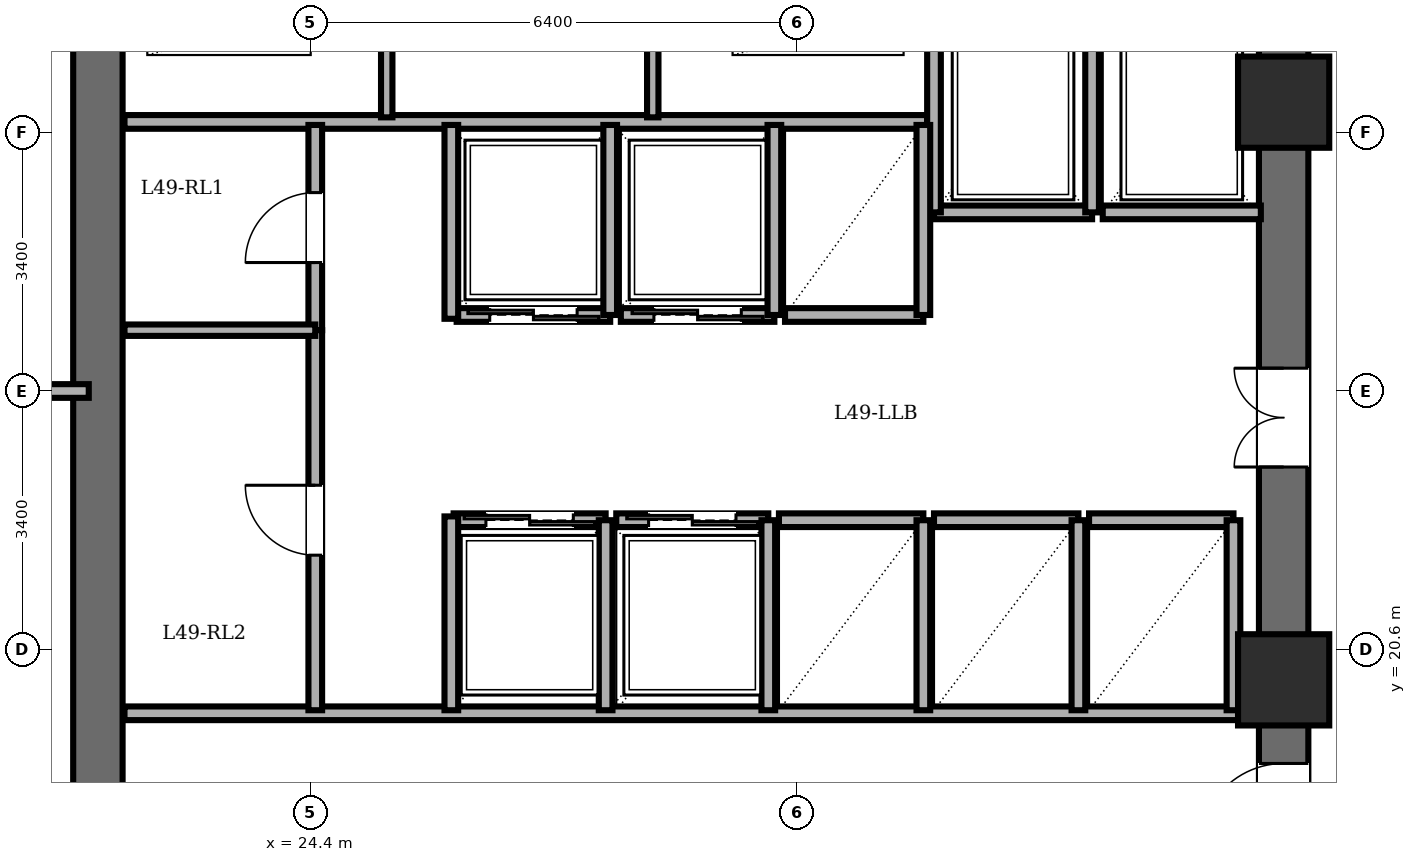
"""IFC4 building model, lengths in metres.
Left out: names, types, materials, properties, quantities, classifications, styles, units other than length and angle.
Written with IfcOpenShell. Run it as: python <this file> out.ifc"""

import sys

from ifc_helpers import new_model, si_unit, direction, frame, frame_2d, origin, origin_2d, place, context, subcontext, project, spatial, rectangle, extrude, element, fill, save


model = new_model("IFC4")
c1 = context("Model", 3, precision=1e-05, world=origin(), true_north=direction((0.0, 1.0)))
c2 = subcontext(c1, "Body", "Model", "MODEL_VIEW")
j1 = project(units=[si_unit("LENGTHUNIT", "METRE"), si_unit("PLANEANGLEUNIT", "RADIAN")], contexts=[c1])
p1 = place(None, origin())
s1 = spatial("IfcSite", under=j1, at=p1, CompositionType="ELEMENT")
p2 = place(p1, origin())
s2 = spatial("IfcBuilding", under=s1, at=p2, CompositionType="ELEMENT")
p3 = place(p2, frame((0.0, 0.0, 187.0)))
s3 = spatial("IfcBuildingStorey", under=s2, at=p3, CompositionType="ELEMENT", Elevation=187.0)
for number, where, z_axis, x_axis in (
    (1, (37.2, 20.2, 0.0), (0.0, 0.0, 1.0), (1.0, 0.0, 0.0)),
    (2, (37.2, 27.8, 0.0), (0.0, 0.0, 1.0), (1.0, 0.0, 0.0)),
):
    element("IfcColumn", number, at=place(p3, frame(where, z_axis=z_axis, x_axis=x_axis)), inside=s3, PredefinedType="COLUMN", context=c2, shape_type="SweptSolid", body=[
        extrude(rectangle(XDim=1.2, YDim=1.2, at=origin_2d()), origin(), (0.0, 0.0, 1.0), 3.6),
    ])
p4 = place(p3, frame((21.6, 14.4, 0.0), z_axis=(0.0, 0.0, 1.0), x_axis=(0.0, 1.0, 0.0)))
e3 = element("IfcWall", 3, at=p4, inside=s3, PredefinedType="SHEAR", context=c2, shape_type="SweptSolid", body=[
    extrude(rectangle(XDim=19.2, YDim=0.65, at=frame_2d((9.6, 0.0))), origin(), (0.0, 0.0, 1.0), 3.36),
])
p5 = place(p3, frame((37.2, 14.4, 0.0), z_axis=(0.0, 0.0, 1.0), x_axis=(0.0, 1.0, 0.0)))
e4 = element("IfcWall", 4, at=p5, inside=s3, PredefinedType="SHEAR", context=c2, shape_type="SweptSolid", body=[
    extrude(rectangle(XDim=19.2, YDim=0.65, at=frame_2d((9.6, 0.0))), origin(), (0.0, 0.0, 1.0), 3.36),
])
p6 = place(p5, frame((15.8, 0.0, 0.0)))
e5 = element("IfcOpeningElement", 5, at=p6, cuts=e4, PredefinedType="OPENING", context=c2, shape_type="SweptSolid", body=[
    extrude(rectangle(XDim=1.15, YDim=2.15, at=frame_2d((0.575, 1.075))), frame((0.0, 0.335, 0.0), z_axis=(0.0, -1.0, 0.0), x_axis=(1.0, 0.0, 0.0)), (0.0, 0.0, 1.0), 0.67),
])
p7 = place(p5, frame((3.6, 0.0, 0.0)))
e6 = element("IfcOpeningElement", 6, at=p7, cuts=e4, PredefinedType="OPENING", context=c2, shape_type="SweptSolid", body=[
    extrude(rectangle(XDim=1.1, YDim=2.15, at=frame_2d((0.55, 1.075))), frame((0.0, 0.335, 0.0), z_axis=(0.0, -1.0, 0.0), x_axis=(1.0, 0.0, 0.0)), (0.0, 0.0, 1.0), 0.67),
])
p8 = place(p5, frame((8.6, 0.0, 0.0)))
e7 = element("IfcOpeningElement", 7, at=p8, cuts=e4, PredefinedType="OPENING", context=c2, shape_type="SweptSolid", body=[
    extrude(rectangle(XDim=1.3, YDim=2.2, at=frame_2d((0.65, 1.1))), frame((0.0, 0.335, 0.0), z_axis=(0.0, -1.0, 0.0), x_axis=(1.0, 0.0, 0.0)), (0.0, 0.0, 1.0), 0.67),
])
p9 = place(p3, frame((21.95, 27.54, 0.0), z_axis=(0.0, 0.0, 1.0), x_axis=(1.0, 0.0, 0.0)))
e8 = element("IfcWall", 8, at=p9, inside=s3, PredefinedType="PARTITIONING", context=c2, shape_type="SweptSolid", body=[
    extrude(rectangle(XDim=10.56, YDim=0.18, at=frame_2d((5.28, 0.0))), origin(), (0.0, 0.0, 1.0), 3.36),
])
for number, where, z_axis, x_axis in (
    (9, (25.4, 27.6, 0.0), (0.0, 0.0, 1.0), (0.0, 1.0, 0.0)),
    (10, (28.9, 27.6, 0.0), (0.0, 0.0, 1.0), (0.0, 1.0, 0.0)),
):
    element("IfcWall", number, at=place(p3, frame(where, z_axis=z_axis, x_axis=x_axis)), inside=s3, PredefinedType="PARTITIONING", context=c2, shape_type="SweptSolid", body=[
        extrude(rectangle(XDim=1.52, YDim=0.15, at=frame_2d((0.76, 0.0))), origin(), (0.0, 0.0, 1.0), 3.36),
    ])
p10 = place(p3, frame((21.95, 19.76, 0.0), z_axis=(0.0, 0.0, 1.0), x_axis=(1.0, 0.0, 0.0)))
e11 = element("IfcWall", 11, at=p10, inside=s3, PredefinedType="PARTITIONING", context=c2, shape_type="SweptSolid", body=[
    extrude(rectangle(XDim=14.87, YDim=0.18, at=frame_2d((7.435, 0.0))), origin(), (0.0, 0.0, 1.0), 3.36),
])
p11 = place(p3, frame((34.68, 26.35, 0.0), z_axis=(0.0, 0.0, 1.0), x_axis=(-1.0, 0.0, 0.0)))
e12 = element("IfcWall", 12, at=p11, inside=s3, PredefinedType="PARTITIONING", context=c2, shape_type="SweptSolid", body=[
    extrude(rectangle(XDim=2.08, YDim=0.18, at=frame_2d((1.04, 0.0))), origin(), (0.0, 0.0, 1.0), 3.36),
])
for number, where, z_axis, x_axis in (
    (13, (34.68, 26.35, 0.0), (0.0, 0.0, 1.0), (0.0, 1.0, 0.0)),
    (14, (32.6, 29.08, 0.0), (0.0, 0.0, 1.0), (0.0, -1.0, 0.0)),
):
    element("IfcWall", number, at=place(p3, frame(where, z_axis=z_axis, x_axis=x_axis)), inside=s3, PredefinedType="PARTITIONING", context=c2, shape_type="SweptSolid", body=[
        extrude(rectangle(XDim=2.73, YDim=0.18, at=frame_2d((1.365, 0.0))), origin(), (0.0, 0.0, 1.0), 3.36),
    ])
p12 = place(p3, frame((36.9, 26.35, 0.0), z_axis=(0.0, 0.0, 1.0), x_axis=(-1.0, 0.0, 0.0)))
e15 = element("IfcWall", 15, at=p12, inside=s3, PredefinedType="PARTITIONING", context=c2, shape_type="SweptSolid", body=[
    extrude(rectangle(XDim=2.08, YDim=0.18, at=frame_2d((1.04, 0.0))), origin(), (0.0, 0.0, 1.0), 3.36),
])
p13 = place(p3, frame((28.34, 25.0, 0.0), z_axis=(0.0, 0.0, 1.0), x_axis=(-1.0, 0.0, 0.0)))
e16 = element("IfcWall", 16, at=p13, inside=s3, PredefinedType="PARTITIONING", context=c2, shape_type="SweptSolid", body=[
    extrude(rectangle(XDim=2.02, YDim=0.18, at=frame_2d((1.01, 0.0))), origin(), (0.0, 0.0, 1.0), 3.36),
])
p14 = place(p13, frame((0.435, 0.0, 0.0)))
e17 = element("IfcOpeningElement", 17, at=p14, cuts=e16, PredefinedType="OPENING", context=c2, shape_type="SweptSolid", body=[
    extrude(rectangle(XDim=1.15, YDim=2.2, at=frame_2d((0.575, 1.1))), frame((0.0, 0.1, 0.0), z_axis=(0.0, -1.0, 0.0), x_axis=(1.0, 0.0, 0.0)), (0.0, 0.0, 1.0), 0.2),
])
p15 = place(p3, frame((28.34, 25.0, 0.0), z_axis=(0.0, 0.0, 1.0), x_axis=(0.0, 1.0, 0.0)))
e18 = element("IfcWall", 18, at=p15, inside=s3, PredefinedType="PARTITIONING", context=c2, shape_type="SweptSolid", body=[
    extrude(rectangle(XDim=2.5, YDim=0.18, at=frame_2d((1.25, 0.0))), origin(), (0.0, 0.0, 1.0), 3.36),
])
p16 = place(p3, frame((30.5, 25.0, 0.0), z_axis=(0.0, 0.0, 1.0), x_axis=(-1.0, 0.0, 0.0)))
e19 = element("IfcWall", 19, at=p16, inside=s3, PredefinedType="PARTITIONING", context=c2, shape_type="SweptSolid", body=[
    extrude(rectangle(XDim=2.02, YDim=0.18, at=frame_2d((1.01, 0.0))), origin(), (0.0, 0.0, 1.0), 3.36),
])
p17 = place(p16, frame((0.435, 0.0, 0.0)))
e20 = element("IfcOpeningElement", 20, at=p17, cuts=e19, PredefinedType="OPENING", context=c2, shape_type="SweptSolid", body=[
    extrude(rectangle(XDim=1.15, YDim=2.2, at=frame_2d((0.575, 1.1))), frame((0.0, 0.1, 0.0), z_axis=(0.0, -1.0, 0.0), x_axis=(1.0, 0.0, 0.0)), (0.0, 0.0, 1.0), 0.2),
])
p18 = place(p3, frame((30.5, 25.0, 0.0), z_axis=(0.0, 0.0, 1.0), x_axis=(0.0, 1.0, 0.0)))
e21 = element("IfcWall", 21, at=p18, inside=s3, PredefinedType="PARTITIONING", context=c2, shape_type="SweptSolid", body=[
    extrude(rectangle(XDim=2.5, YDim=0.18, at=frame_2d((1.25, 0.0))), origin(), (0.0, 0.0, 1.0), 3.36),
])
p19 = place(p3, frame((26.28, 22.3, 0.0), z_axis=(0.0, 0.0, 1.0), x_axis=(1.0, 0.0, 0.0)))
e22 = element("IfcWall", 22, at=p19, inside=s3, PredefinedType="PARTITIONING", context=c2, shape_type="SweptSolid", body=[
    extrude(rectangle(XDim=2.0, YDim=0.18, at=frame_2d((1.0, 0.0))), origin(), (0.0, 0.0, 1.0), 3.36),
])
p20 = place(p19, frame((0.425, 0.0, 0.0)))
e23 = element("IfcOpeningElement", 23, at=p20, cuts=e22, PredefinedType="OPENING", context=c2, shape_type="SweptSolid", body=[
    extrude(rectangle(XDim=1.15, YDim=2.2, at=frame_2d((0.575, 1.1))), frame((0.0, 0.1, 0.0), z_axis=(0.0, -1.0, 0.0), x_axis=(1.0, 0.0, 0.0)), (0.0, 0.0, 1.0), 0.2),
])
p21 = place(p3, frame((28.28, 19.8, 0.0), z_axis=(0.0, 0.0, 1.0), x_axis=(0.0, 1.0, 0.0)))
e24 = element("IfcWall", 24, at=p21, inside=s3, PredefinedType="PARTITIONING", context=c2, shape_type="SweptSolid", body=[
    extrude(rectangle(XDim=2.5, YDim=0.18, at=frame_2d((1.25, 0.0))), origin(), (0.0, 0.0, 1.0), 3.36),
])
p22 = place(p3, frame((28.42, 22.3, 0.0), z_axis=(0.0, 0.0, 1.0), x_axis=(1.0, 0.0, 0.0)))
e25 = element("IfcWall", 25, at=p22, inside=s3, PredefinedType="PARTITIONING", context=c2, shape_type="SweptSolid", body=[
    extrude(rectangle(XDim=2.0, YDim=0.18, at=frame_2d((1.0, 0.0))), origin(), (0.0, 0.0, 1.0), 3.36),
])
p23 = place(p22, frame((0.425, 0.0, 0.0)))
e26 = element("IfcOpeningElement", 26, at=p23, cuts=e25, PredefinedType="OPENING", context=c2, shape_type="SweptSolid", body=[
    extrude(rectangle(XDim=1.15, YDim=2.2, at=frame_2d((0.575, 1.1))), frame((0.0, 0.1, 0.0), z_axis=(0.0, -1.0, 0.0), x_axis=(1.0, 0.0, 0.0)), (0.0, 0.0, 1.0), 0.2),
])
p24 = place(p3, frame((30.42, 19.8, 0.0), z_axis=(0.0, 0.0, 1.0), x_axis=(0.0, 1.0, 0.0)))
e27 = element("IfcWall", 27, at=p24, inside=s3, PredefinedType="PARTITIONING", context=c2, shape_type="SweptSolid", body=[
    extrude(rectangle(XDim=2.5, YDim=0.18, at=frame_2d((1.25, 0.0))), origin(), (0.0, 0.0, 1.0), 3.36),
])
p25 = place(p3, frame((32.46, 25.0, 0.0), z_axis=(0.0, 0.0, 1.0), x_axis=(-1.0, 0.0, 0.0)))
e28 = element("IfcWall", 28, at=p25, inside=s3, PredefinedType="PARTITIONING", context=c2, shape_type="SweptSolid", body=[
    extrude(rectangle(XDim=1.82, YDim=0.18, at=frame_2d((0.91, 0.0))), origin(), (0.0, 0.0, 1.0), 3.36),
])
p26 = place(p3, frame((32.46, 25.0, 0.0), z_axis=(0.0, 0.0, 1.0), x_axis=(0.0, 1.0, 0.0)))
e29 = element("IfcWall", 29, at=p26, inside=s3, PredefinedType="PARTITIONING", context=c2, shape_type="SweptSolid", body=[
    extrude(rectangle(XDim=2.5, YDim=0.18, at=frame_2d((1.25, 0.0))), origin(), (0.0, 0.0, 1.0), 3.36),
])
p27 = place(p3, frame((30.56, 22.3, 0.0), z_axis=(0.0, 0.0, 1.0), x_axis=(1.0, 0.0, 0.0)))
e30 = element("IfcWall", 30, at=p27, inside=s3, PredefinedType="PARTITIONING", context=c2, shape_type="SweptSolid", body=[
    extrude(rectangle(XDim=1.9, YDim=0.18, at=frame_2d((0.95, 0.0))), origin(), (0.0, 0.0, 1.0), 3.36),
])
p28 = place(p3, frame((32.46, 19.8, 0.0), z_axis=(0.0, 0.0, 1.0), x_axis=(0.0, 1.0, 0.0)))
e31 = element("IfcWall", 31, at=p28, inside=s3, PredefinedType="PARTITIONING", context=c2, shape_type="SweptSolid", body=[
    extrude(rectangle(XDim=2.5, YDim=0.18, at=frame_2d((1.25, 0.0))), origin(), (0.0, 0.0, 1.0), 3.36),
])
p29 = place(p3, frame((32.6, 22.3, 0.0), z_axis=(0.0, 0.0, 1.0), x_axis=(1.0, 0.0, 0.0)))
e32 = element("IfcWall", 32, at=p29, inside=s3, PredefinedType="PARTITIONING", context=c2, shape_type="SweptSolid", body=[
    extrude(rectangle(XDim=1.9, YDim=0.18, at=frame_2d((0.95, 0.0))), origin(), (0.0, 0.0, 1.0), 3.36),
])
p30 = place(p3, frame((34.5, 19.8, 0.0), z_axis=(0.0, 0.0, 1.0), x_axis=(0.0, 1.0, 0.0)))
e33 = element("IfcWall", 33, at=p30, inside=s3, PredefinedType="PARTITIONING", context=c2, shape_type="SweptSolid", body=[
    extrude(rectangle(XDim=2.5, YDim=0.18, at=frame_2d((1.25, 0.0))), origin(), (0.0, 0.0, 1.0), 3.36),
])
p31 = place(p3, frame((34.64, 22.3, 0.0), z_axis=(0.0, 0.0, 1.0), x_axis=(1.0, 0.0, 0.0)))
e34 = element("IfcWall", 34, at=p31, inside=s3, PredefinedType="PARTITIONING", context=c2, shape_type="SweptSolid", body=[
    extrude(rectangle(XDim=1.9, YDim=0.18, at=frame_2d((0.95, 0.0))), origin(), (0.0, 0.0, 1.0), 3.36),
])
p32 = place(p3, frame((36.54, 19.8, 0.0), z_axis=(0.0, 0.0, 1.0), x_axis=(0.0, 1.0, 0.0)))
e35 = element("IfcWall", 35, at=p32, inside=s3, PredefinedType="PARTITIONING", context=c2, shape_type="SweptSolid", body=[
    extrude(rectangle(XDim=2.5, YDim=0.18, at=frame_2d((1.25, 0.0))), origin(), (0.0, 0.0, 1.0), 3.36),
])
p33 = place(p3, frame((24.46, 24.8, 0.0), z_axis=(0.0, 0.0, 1.0), x_axis=(0.0, 1.0, 0.0)))
e36 = element("IfcWall", 36, at=p33, inside=s3, PredefinedType="PARTITIONING", context=c2, shape_type="SweptSolid", body=[
    extrude(rectangle(XDim=2.7, YDim=0.18, at=frame_2d((1.35, 0.0))), origin(), (0.0, 0.0, 1.0), 3.36),
])
p34 = place(p33, frame((0.89, 0.0, 0.0)))
e37 = element("IfcOpeningElement", 37, at=p34, cuts=e36, PredefinedType="OPENING", context=c2, shape_type="SweptSolid", body=[
    extrude(rectangle(XDim=0.92, YDim=2.1, at=frame_2d((0.46, 1.05))), frame((0.0, 0.1, 0.0), z_axis=(0.0, -1.0, 0.0), x_axis=(1.0, 0.0, 0.0)), (0.0, 0.0, 1.0), 0.2),
])
p35 = place(p3, frame((24.46, 19.8, 0.0), z_axis=(0.0, 0.0, 1.0), x_axis=(0.0, 1.0, 0.0)))
e38 = element("IfcWall", 38, at=p35, inside=s3, PredefinedType="PARTITIONING", context=c2, shape_type="SweptSolid", body=[
    extrude(rectangle(XDim=5.0, YDim=0.18, at=frame_2d((2.5, 0.0))), origin(), (0.0, 0.0, 1.0), 3.36),
])
p36 = place(p35, frame((2.04, 0.0, 0.0)))
e39 = element("IfcOpeningElement", 39, at=p36, cuts=e38, PredefinedType="OPENING", context=c2, shape_type="SweptSolid", body=[
    extrude(rectangle(XDim=0.92, YDim=2.1, at=frame_2d((0.46, 1.05))), frame((0.0, 0.1, 0.0), z_axis=(0.0, -1.0, 0.0), x_axis=(1.0, 0.0, 0.0)), (0.0, 0.0, 1.0), 0.2),
])
p37 = place(p3, frame((21.95, 24.8, 0.0), z_axis=(0.0, 0.0, 1.0), x_axis=(1.0, 0.0, 0.0)))
e40 = element("IfcWall", 40, at=p37, inside=s3, PredefinedType="PARTITIONING", context=c2, shape_type="SweptSolid", body=[
    extrude(rectangle(XDim=2.51, YDim=0.15, at=frame_2d((1.255, 0.0))), origin(), (0.0, 0.0, 1.0), 3.36),
])
for number, where, z_axis, x_axis in (
    (41, (26.25, 24.95, 0.0), (0.0, 0.0, 1.0), (0.0, 1.0, 0.0)),
    (42, (26.25, 19.8, 0.0), (0.0, 0.0, 1.0), (0.0, 1.0, 0.0)),
):
    element("IfcWall", number, at=place(p3, frame(where, z_axis=z_axis, x_axis=x_axis)), inside=s3, PredefinedType="PARTITIONING", context=c2, shape_type="SweptSolid", body=[
        extrude(rectangle(XDim=2.55, YDim=0.18, at=frame_2d((1.275, 0.0))), origin(), (0.0, 0.0, 1.0), 3.36),
    ])
p38 = place(p3, frame((13.8, 24.0, 0.0), z_axis=(0.0, 0.0, 1.0), x_axis=(1.0, 0.0, 0.0)))
e43 = element("IfcWall", 43, at=p38, inside=s3, PredefinedType="PARTITIONING", context=c2, shape_type="SweptSolid", body=[
    extrude(rectangle(XDim=7.68, YDim=0.18, at=frame_2d((3.84, 0.0))), origin(), (0.0, 0.0, 1.0), 3.36),
])
p39 = place(p7, origin())
e44 = element("IfcDoor", 44, at=p39, inside=s3, OperationType="SINGLE_SWING_LEFT", PredefinedType="DOOR", context=c2, shape_type="SweptSolid", body=[
    extrude(rectangle(XDim=1.1, YDim=2.15, at=frame_2d((0.55, 1.075))), frame((0.0, 0.025, 0.0), z_axis=(0.0, -1.0, 0.0), x_axis=(1.0, 0.0, 0.0)), (0.0, 0.0, 1.0), 0.05),
])
fill(e6, e44)
p40 = place(p14, origin())
e45 = element("IfcDoor", 45, at=p40, inside=s3, OperationType="DOUBLE_DOOR_SLIDING", PredefinedType="DOOR", context=c2, shape_type="SweptSolid", body=[
    extrude(rectangle(XDim=1.15, YDim=2.2, at=frame_2d((0.575, 1.1))), frame((0.0, 0.025, 0.0), z_axis=(0.0, -1.0, 0.0), x_axis=(1.0, 0.0, 0.0)), (0.0, 0.0, 1.0), 0.05),
])
fill(e17, e45)
p41 = place(p17, origin())
e46 = element("IfcDoor", 46, at=p41, inside=s3, OperationType="DOUBLE_DOOR_SLIDING", PredefinedType="DOOR", context=c2, shape_type="SweptSolid", body=[
    extrude(rectangle(XDim=1.15, YDim=2.2, at=frame_2d((0.575, 1.1))), frame((0.0, 0.025, 0.0), z_axis=(0.0, -1.0, 0.0), x_axis=(1.0, 0.0, 0.0)), (0.0, 0.0, 1.0), 0.05),
])
fill(e20, e46)
p42 = place(p20, origin())
e47 = element("IfcDoor", 47, at=p42, inside=s3, OperationType="DOUBLE_DOOR_SLIDING", PredefinedType="DOOR", context=c2, shape_type="SweptSolid", body=[
    extrude(rectangle(XDim=1.15, YDim=2.2, at=frame_2d((0.575, 1.1))), frame((0.0, 0.025, 0.0), z_axis=(0.0, -1.0, 0.0), x_axis=(1.0, 0.0, 0.0)), (0.0, 0.0, 1.0), 0.05),
])
fill(e23, e47)
p43 = place(p23, origin())
e48 = element("IfcDoor", 48, at=p43, inside=s3, OperationType="DOUBLE_DOOR_SLIDING", PredefinedType="DOOR", context=c2, shape_type="SweptSolid", body=[
    extrude(rectangle(XDim=1.15, YDim=2.2, at=frame_2d((0.575, 1.1))), frame((0.0, 0.025, 0.0), z_axis=(0.0, -1.0, 0.0), x_axis=(1.0, 0.0, 0.0)), (0.0, 0.0, 1.0), 0.05),
])
fill(e26, e48)
p44 = place(p34, origin())
e49 = element("IfcDoor", 49, at=p44, inside=s3, OperationType="SINGLE_SWING_LEFT", PredefinedType="DOOR", context=c2, shape_type="SweptSolid", body=[
    extrude(rectangle(XDim=0.92, YDim=2.1, at=frame_2d((0.46, 1.05))), frame((0.0, 0.025, 0.0), z_axis=(0.0, -1.0, 0.0), x_axis=(1.0, 0.0, 0.0)), (0.0, 0.0, 1.0), 0.05),
])
fill(e37, e49)
p45 = place(p36, origin())
e50 = element("IfcDoor", 50, at=p45, inside=s3, OperationType="SINGLE_SWING_RIGHT", PredefinedType="DOOR", context=c2, shape_type="SweptSolid", body=[
    extrude(rectangle(XDim=0.92, YDim=2.1, at=frame_2d((0.46, 1.05))), frame((0.0, 0.025, 0.0), z_axis=(0.0, -1.0, 0.0), x_axis=(1.0, 0.0, 0.0)), (0.0, 0.0, 1.0), 0.05),
])
fill(e39, e50)
p46 = place(p8, origin())
e51 = element("IfcDoor", 51, at=p46, inside=s3, OperationType="DOUBLE_DOOR_SINGLE_SWING", PredefinedType="DOOR", context=c2, shape_type="SweptSolid", body=[
    extrude(rectangle(XDim=1.3, YDim=2.2, at=frame_2d((0.65, 1.1))), frame((0.0, 0.025, 0.0), z_axis=(0.0, -1.0, 0.0), x_axis=(1.0, 0.0, 0.0)), (0.0, 0.0, 1.0), 0.05),
])
fill(e7, e51)
save(model, sys.argv[1])
